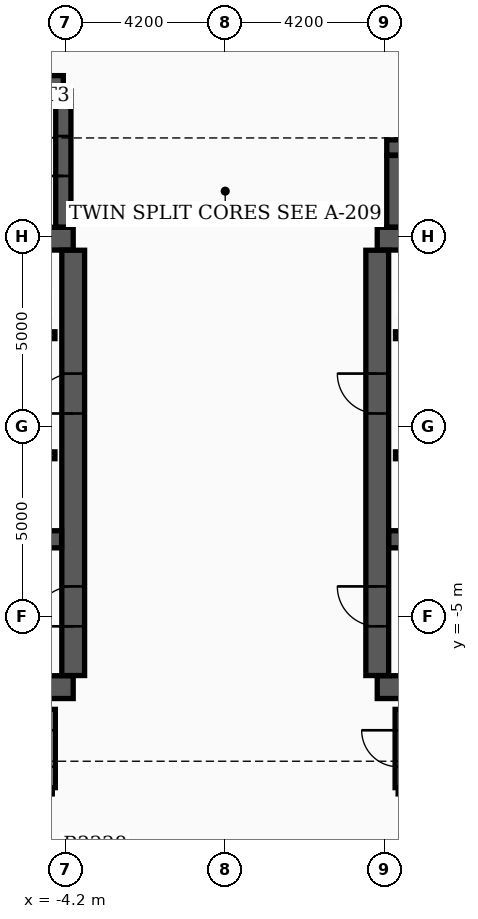
"""IFC4 building model, lengths in metres.
Left out: names, types, materials, properties, quantities, classifications, styles, units other than length and angle.
Written with IfcOpenShell. Run it as: python <this file> out.ifc"""

import sys

from ifc_helpers import new_model, si_unit, direction, frame, frame_2d, origin, place, context, subcontext, project, spatial, rectangle, extrude, element, fill, save


model = new_model("IFC4")
c1 = context("Model", 3, precision=1e-05, world=origin(), true_north=direction((0.0, 1.0)))
c2 = subcontext(c1, "Body", "Model", "MODEL_VIEW")
j1 = project(units=[si_unit("LENGTHUNIT", "METRE"), si_unit("PLANEANGLEUNIT", "RADIAN")], contexts=[c1])
p1 = place(None, origin())
s1 = spatial("IfcSite", under=j1, at=p1, CompositionType="ELEMENT")
p2 = place(p1, origin())
s2 = spatial("IfcBuilding", under=s1, at=p2, CompositionType="ELEMENT")
p3 = place(p2, frame((0.0, 0.0, 139.8)))
s3 = spatial("IfcBuildingStorey", under=s2, at=p3, CompositionType="ELEMENT", Elevation=139.8)
for number, where, z_axis, x_axis in (
    (1, (-12.4, -6.85, 0.0), (0.0, 0.0, 1.0), (1.0, 0.0, 0.0)),
    (2, (-12.4, 4.95, 0.0), (0.0, 0.0, 1.0), (1.0, 0.0, 0.0)),
):
    element("IfcWall", number, at=place(p3, frame(where, z_axis=z_axis, x_axis=x_axis)), inside=s3, PredefinedType="SHEAR", context=c2, shape_type="SweptSolid", body=[
        extrude(rectangle(XDim=8.4, YDim=0.6, at=frame_2d((4.2, 0.0))), origin(), (0.0, 0.0, 1.0), 3.65),
    ])
p4 = place(p3, frame((-4.0, -6.545, 0.0), z_axis=(0.0, 0.0, 1.0), x_axis=(0.0, 1.0, 0.0)))
e3 = element("IfcWall", 3, at=p4, inside=s3, PredefinedType="SHEAR", context=c2, shape_type="SweptSolid", body=[
    extrude(rectangle(XDim=11.19, YDim=0.6, at=frame_2d((5.595, 0.0))), origin(), (0.0, 0.0, 1.0), 3.65),
])
p5 = place(p4, frame((1.295, 0.0, 0.0)))
e4 = element("IfcOpeningElement", 4, at=p5, cuts=e3, PredefinedType="OPENING", context=c2, shape_type="SweptSolid", body=[
    extrude(rectangle(XDim=1.05, YDim=2.15, at=frame_2d((0.525, 1.075))), frame((0.0, 0.31, 0.0), z_axis=(0.0, -1.0, 0.0), x_axis=(1.0, 0.0, 0.0)), (0.0, 0.0, 1.0), 0.62),
])
p6 = place(p4, frame((6.895, 0.0, 0.0)))
e5 = element("IfcOpeningElement", 5, at=p6, cuts=e3, PredefinedType="OPENING", context=c2, shape_type="SweptSolid", body=[
    extrude(rectangle(XDim=1.05, YDim=2.15, at=frame_2d((0.525, 1.075))), frame((0.0, 0.31, 0.0), z_axis=(0.0, -1.0, 0.0), x_axis=(1.0, 0.0, 0.0)), (0.0, 0.0, 1.0), 0.62),
])
p7 = place(p3, frame((-12.095, -2.96, 0.0), z_axis=(0.0, 0.0, 1.0), x_axis=(1.0, 0.0, 0.0)))
e6 = element("IfcWall", 6, at=p7, inside=s3, PredefinedType="SHEAR", context=c2, shape_type="SweptSolid", body=[
    extrude(rectangle(XDim=7.79, YDim=0.45, at=frame_2d((3.895, 0.0))), origin(), (0.0, 0.0, 1.0), 3.65),
])
for number, where, z_axis, x_axis in (
    (7, (4.0, -6.85, 0.0), (0.0, 0.0, 1.0), (1.0, 0.0, 0.0)),
    (8, (4.0, 4.95, 0.0), (0.0, 0.0, 1.0), (1.0, 0.0, 0.0)),
):
    element("IfcWall", number, at=place(p3, frame(where, z_axis=z_axis, x_axis=x_axis)), inside=s3, PredefinedType="SHEAR", context=c2, shape_type="SweptSolid", body=[
        extrude(rectangle(XDim=8.4, YDim=0.6, at=frame_2d((4.2, 0.0))), origin(), (0.0, 0.0, 1.0), 3.65),
    ])
p8 = place(p3, frame((4.0, -6.545, 0.0), z_axis=(0.0, 0.0, 1.0), x_axis=(0.0, 1.0, 0.0)))
e9 = element("IfcWall", 9, at=p8, inside=s3, PredefinedType="SHEAR", context=c2, shape_type="SweptSolid", body=[
    extrude(rectangle(XDim=11.19, YDim=0.6, at=frame_2d((5.595, 0.0))), origin(), (0.0, 0.0, 1.0), 3.65),
])
p9 = place(p8, frame((1.295, 0.0, 0.0)))
e10 = element("IfcOpeningElement", 10, at=p9, cuts=e9, PredefinedType="OPENING", context=c2, shape_type="SweptSolid", body=[
    extrude(rectangle(XDim=1.05, YDim=2.15, at=frame_2d((0.525, 1.075))), frame((0.0, 0.31, 0.0), z_axis=(0.0, -1.0, 0.0), x_axis=(1.0, 0.0, 0.0)), (0.0, 0.0, 1.0), 0.62),
])
p10 = place(p8, frame((6.895, 0.0, 0.0)))
e11 = element("IfcOpeningElement", 11, at=p10, cuts=e9, PredefinedType="OPENING", context=c2, shape_type="SweptSolid", body=[
    extrude(rectangle(XDim=1.05, YDim=2.15, at=frame_2d((0.525, 1.075))), frame((0.0, 0.31, 0.0), z_axis=(0.0, -1.0, 0.0), x_axis=(1.0, 0.0, 0.0)), (0.0, 0.0, 1.0), 0.62),
])
p11 = place(p3, frame((4.305, -2.96, 0.0), z_axis=(0.0, 0.0, 1.0), x_axis=(1.0, 0.0, 0.0)))
e12 = element("IfcWall", 12, at=p11, inside=s3, PredefinedType="SHEAR", context=c2, shape_type="SweptSolid", body=[
    extrude(rectangle(XDim=7.79, YDim=0.45, at=frame_2d((3.895, 0.0))), origin(), (0.0, 0.0, 1.0), 3.65),
])
p12 = place(p3, frame((-12.22, 9.04, 0.0), z_axis=(0.0, 0.0, 1.0), x_axis=(1.0, 0.0, 0.0)))
e13 = element("IfcWall", 13, at=p12, inside=s3, PredefinedType="SHEAR", context=c2, shape_type="SweptSolid", body=[
    extrude(rectangle(XDim=7.96, YDim=0.4, at=frame_2d((3.98, 0.0))), origin(), (0.0, 0.0, 1.0), 3.65),
])
p13 = place(p3, frame((-4.26, 5.255, 0.0), z_axis=(0.0, 0.0, 1.0), x_axis=(0.0, 1.0, 0.0)))
e14 = element("IfcWall", 14, at=p13, inside=s3, PredefinedType="SHEAR", context=c2, shape_type="SweptSolid", body=[
    extrude(rectangle(XDim=3.58, YDim=0.4, at=frame_2d((1.79, 0.0))), origin(), (0.0, 0.0, 1.0), 3.65),
])
p14 = place(p13, frame((1.345, 0.0, 0.0)))
e15 = element("IfcOpeningElement", 15, at=p14, cuts=e14, PredefinedType="OPENING", context=c2, shape_type="SweptSolid", body=[
    extrude(rectangle(XDim=1.05, YDim=2.15, at=frame_2d((0.525, 1.075))), frame((0.0, 0.21, 0.0), z_axis=(0.0, -1.0, 0.0), x_axis=(1.0, 0.0, 0.0)), (0.0, 0.0, 1.0), 0.42),
])
p15 = place(p3, frame((4.45, 5.255, 0.0), z_axis=(0.0, 0.0, 1.0), x_axis=(0.0, 1.0, 0.0)))
e16 = element("IfcWall", 16, at=p15, inside=s3, PredefinedType="SHEAR", context=c2, shape_type="SweptSolid", body=[
    extrude(rectangle(XDim=1.885, YDim=0.4, at=frame_2d((0.942, 0.0))), origin(), (0.0, 0.0, 1.0), 3.65),
])
p16 = place(p3, frame((4.25, 7.35, 0.0), z_axis=(0.0, 0.0, 1.0), x_axis=(1.0, 0.0, 0.0)))
e17 = element("IfcWall", 17, at=p16, inside=s3, PredefinedType="SHEAR", context=c2, shape_type="SweptSolid", body=[
    extrude(rectangle(XDim=5.4, YDim=0.4, at=frame_2d((2.7, 0.0))), origin(), (0.0, 0.0, 1.0), 3.65),
])
p17 = place(p3, frame((-11.9, 2.41, 0.0), z_axis=(0.0, 0.0, 1.0), x_axis=(1.0, 0.0, 0.0)))
e18 = element("IfcWall", 18, at=p17, inside=s3, PredefinedType="SOLIDWALL", context=c2, shape_type="SweptSolid", body=[
    extrude(rectangle(XDim=7.42, YDim=0.18, at=frame_2d((3.71, 0.0))), origin(), (0.0, 0.0, 1.0), 2.91),
])
p18 = place(p17, frame((0.55, 0.0, 0.0)))
e19 = element("IfcOpeningElement", 19, at=p18, cuts=e18, PredefinedType="OPENING", context=c2, shape_type="SweptSolid", body=[
    extrude(rectangle(XDim=1.1, YDim=2.15, at=frame_2d((0.55, 1.075))), frame((0.0, 0.1, 0.0), z_axis=(0.0, -1.0, 0.0), x_axis=(1.0, 0.0, 0.0)), (0.0, 0.0, 1.0), 0.2),
])
p19 = place(p17, frame((4.9, 0.0, 0.0)))
e20 = element("IfcOpeningElement", 20, at=p19, cuts=e18, PredefinedType="OPENING", context=c2, shape_type="SweptSolid", body=[
    extrude(rectangle(XDim=0.88, YDim=2.1, at=frame_2d((0.44, 1.05))), frame((0.0, 0.1, 0.0), z_axis=(0.0, -1.0, 0.0), x_axis=(1.0, 0.0, 0.0)), (0.0, 0.0, 1.0), 0.2),
])
p20 = place(p3, frame((4.48, 2.41, 0.0), z_axis=(0.0, 0.0, 1.0), x_axis=(1.0, 0.0, 0.0)))
e21 = element("IfcWall", 21, at=p20, inside=s3, PredefinedType="SOLIDWALL", context=c2, shape_type="SweptSolid", body=[
    extrude(rectangle(XDim=7.42, YDim=0.18, at=frame_2d((3.71, 0.0))), origin(), (0.0, 0.0, 1.0), 2.91),
])
p21 = place(p20, frame((5.67, 0.0, 0.0)))
e22 = element("IfcOpeningElement", 22, at=p21, cuts=e21, PredefinedType="OPENING", context=c2, shape_type="SweptSolid", body=[
    extrude(rectangle(XDim=1.1, YDim=2.15, at=frame_2d((0.55, 1.075))), frame((0.0, 0.1, 0.0), z_axis=(0.0, -1.0, 0.0), x_axis=(1.0, 0.0, 0.0)), (0.0, 0.0, 1.0), 0.2),
])
p22 = place(p20, frame((1.6, 0.0, 0.0)))
e23 = element("IfcOpeningElement", 23, at=p22, cuts=e21, PredefinedType="OPENING", context=c2, shape_type="SweptSolid", body=[
    extrude(rectangle(XDim=0.88, YDim=2.1, at=frame_2d((0.44, 1.05))), frame((0.0, 0.1, 0.0), z_axis=(0.0, -1.0, 0.0), x_axis=(1.0, 0.0, 0.0)), (0.0, 0.0, 1.0), 0.2),
])
p23 = place(p3, frame((-11.9, -0.75, 0.0), z_axis=(0.0, 0.0, 1.0), x_axis=(1.0, 0.0, 0.0)))
e24 = element("IfcWall", 24, at=p23, inside=s3, PredefinedType="SOLIDWALL", context=c2, shape_type="SweptSolid", body=[
    extrude(rectangle(XDim=7.42, YDim=0.18, at=frame_2d((3.71, 0.0))), origin(), (0.0, 0.0, 1.0), 2.91),
])
p24 = place(p23, frame((0.45, 0.0, 0.0)))
e25 = element("IfcOpeningElement", 25, at=p24, cuts=e24, PredefinedType="OPENING", context=c2, shape_type="SweptSolid", body=[
    extrude(rectangle(XDim=1.1, YDim=2.15, at=frame_2d((0.55, 1.075))), frame((0.0, 0.1, 0.0), z_axis=(0.0, -1.0, 0.0), x_axis=(1.0, 0.0, 0.0)), (0.0, 0.0, 1.0), 0.2),
])
p25 = place(p23, frame((2.35, 0.0, 0.0)))
e26 = element("IfcOpeningElement", 26, at=p25, cuts=e24, PredefinedType="OPENING", context=c2, shape_type="SweptSolid", body=[
    extrude(rectangle(XDim=1.1, YDim=2.15, at=frame_2d((0.55, 1.075))), frame((0.0, 0.1, 0.0), z_axis=(0.0, -1.0, 0.0), x_axis=(1.0, 0.0, 0.0)), (0.0, 0.0, 1.0), 0.2),
])
p26 = place(p3, frame((4.48, -0.75, 0.0), z_axis=(0.0, 0.0, 1.0), x_axis=(1.0, 0.0, 0.0)))
e27 = element("IfcWall", 27, at=p26, inside=s3, PredefinedType="SOLIDWALL", context=c2, shape_type="SweptSolid", body=[
    extrude(rectangle(XDim=7.42, YDim=0.18, at=frame_2d((3.71, 0.0))), origin(), (0.0, 0.0, 1.0), 2.91),
])
p27 = place(p26, frame((0.52, 0.0, 0.0)))
e28 = element("IfcOpeningElement", 28, at=p27, cuts=e27, PredefinedType="OPENING", context=c2, shape_type="SweptSolid", body=[
    extrude(rectangle(XDim=1.1, YDim=2.15, at=frame_2d((0.55, 1.075))), frame((0.0, 0.1, 0.0), z_axis=(0.0, -1.0, 0.0), x_axis=(1.0, 0.0, 0.0)), (0.0, 0.0, 1.0), 0.2),
])
p28 = place(p3, frame((4.55, -9.58, 0.0), z_axis=(0.0, 0.0, 1.0), x_axis=(1.0, 0.0, 0.0)))
e29 = element("IfcWall", 29, at=p28, inside=s3, PredefinedType="PARTITIONING", context=c2, shape_type="SweptSolid", body=[
    extrude(rectangle(XDim=8.1, YDim=0.16, at=frame_2d((4.05, 0.0))), origin(), (0.0, 0.0, 1.0), 2.91),
])
p29 = place(p3, frame((4.55, -9.495, 0.0), z_axis=(0.0, 0.0, 1.0), x_axis=(0.0, 1.0, 0.0)))
e30 = element("IfcWall", 30, at=p29, inside=s3, PredefinedType="PARTITIONING", context=c2, shape_type="SweptSolid", body=[
    extrude(rectangle(XDim=2.06, YDim=0.16, at=frame_2d((1.03, 0.0))), origin(), (0.0, 0.0, 1.0), 2.91),
])
p30 = place(p29, frame((0.55, 0.0, 0.0)))
e31 = element("IfcOpeningElement", 31, at=p30, cuts=e30, PredefinedType="OPENING", context=c2, shape_type="SweptSolid", body=[
    extrude(rectangle(XDim=0.96, YDim=2.15, at=frame_2d((0.48, 1.075))), frame((0.0, 0.09, 0.0), z_axis=(0.0, -1.0, 0.0), x_axis=(1.0, 0.0, 0.0)), (0.0, 0.0, 1.0), 0.18),
])
p31 = place(p3, frame((-4.55, -9.495, 0.0), z_axis=(0.0, 0.0, 1.0), x_axis=(0.0, 1.0, 0.0)))
e32 = element("IfcWall", 32, at=p31, inside=s3, PredefinedType="PARTITIONING", context=c2, shape_type="SweptSolid", body=[
    extrude(rectangle(XDim=2.06, YDim=0.16, at=frame_2d((1.03, 0.0))), origin(), (0.0, 0.0, 1.0), 2.91),
])
p32 = place(p31, frame((0.55, 0.0, 0.0)))
e33 = element("IfcOpeningElement", 33, at=p32, cuts=e32, PredefinedType="OPENING", context=c2, shape_type="SweptSolid", body=[
    extrude(rectangle(XDim=0.96, YDim=2.15, at=frame_2d((0.48, 1.075))), frame((0.0, 0.09, 0.0), z_axis=(0.0, -1.0, 0.0), x_axis=(1.0, 0.0, 0.0)), (0.0, 0.0, 1.0), 0.18),
])
p33 = place(p5, origin())
e34 = element("IfcDoor", 34, at=p33, inside=s3, OperationType="SINGLE_SWING_LEFT", PredefinedType="DOOR", context=c2, shape_type="SweptSolid", body=[
    extrude(rectangle(XDim=1.05, YDim=2.15, at=frame_2d((0.525, 1.075))), frame((0.0, 0.025, 0.0), z_axis=(0.0, -1.0, 0.0), x_axis=(1.0, 0.0, 0.0)), (0.0, 0.0, 1.0), 0.05),
])
fill(e4, e34)
p34 = place(p9, origin())
e35 = element("IfcDoor", 35, at=p34, inside=s3, OperationType="SINGLE_SWING_RIGHT", PredefinedType="DOOR", context=c2, shape_type="SweptSolid", body=[
    extrude(rectangle(XDim=1.05, YDim=2.15, at=frame_2d((0.525, 1.075))), frame((0.0, 0.025, 0.0), z_axis=(0.0, -1.0, 0.0), x_axis=(1.0, 0.0, 0.0)), (0.0, 0.0, 1.0), 0.05),
])
fill(e10, e35)
p35 = place(p6, origin())
e36 = element("IfcDoor", 36, at=p35, inside=s3, OperationType="SINGLE_SWING_LEFT", PredefinedType="DOOR", context=c2, shape_type="SweptSolid", body=[
    extrude(rectangle(XDim=1.05, YDim=2.15, at=frame_2d((0.525, 1.075))), frame((0.0, 0.025, 0.0), z_axis=(0.0, -1.0, 0.0), x_axis=(1.0, 0.0, 0.0)), (0.0, 0.0, 1.0), 0.05),
])
fill(e5, e36)
p36 = place(p10, origin())
e37 = element("IfcDoor", 37, at=p36, inside=s3, OperationType="SINGLE_SWING_RIGHT", PredefinedType="DOOR", context=c2, shape_type="SweptSolid", body=[
    extrude(rectangle(XDim=1.05, YDim=2.15, at=frame_2d((0.525, 1.075))), frame((0.0, 0.025, 0.0), z_axis=(0.0, -1.0, 0.0), x_axis=(1.0, 0.0, 0.0)), (0.0, 0.0, 1.0), 0.05),
])
fill(e11, e37)
p37 = place(p14, origin())
e38 = element("IfcDoor", 38, at=p37, inside=s3, OperationType="SINGLE_SWING_LEFT", PredefinedType="DOOR", context=c2, shape_type="SweptSolid", body=[
    extrude(rectangle(XDim=1.05, YDim=2.15, at=frame_2d((0.525, 1.075))), frame((0.0, 0.025, 0.0), z_axis=(0.0, -1.0, 0.0), x_axis=(1.0, 0.0, 0.0)), (0.0, 0.0, 1.0), 0.05),
])
fill(e15, e38)
p38 = place(p30, origin())
e39 = element("IfcDoor", 39, at=p38, inside=s3, OperationType="SINGLE_SWING_RIGHT", PredefinedType="DOOR", context=c2, shape_type="SweptSolid", body=[
    extrude(rectangle(XDim=0.96, YDim=2.15, at=frame_2d((0.48, 1.075))), frame((0.0, 0.025, 0.0), z_axis=(0.0, -1.0, 0.0), x_axis=(1.0, 0.0, 0.0)), (0.0, 0.0, 1.0), 0.05),
])
fill(e31, e39)
p39 = place(p32, origin())
e40 = element("IfcDoor", 40, at=p39, inside=s3, OperationType="SINGLE_SWING_LEFT", PredefinedType="DOOR", context=c2, shape_type="SweptSolid", body=[
    extrude(rectangle(XDim=0.96, YDim=2.15, at=frame_2d((0.48, 1.075))), frame((0.0, 0.025, 0.0), z_axis=(0.0, -1.0, 0.0), x_axis=(1.0, 0.0, 0.0)), (0.0, 0.0, 1.0), 0.05),
])
fill(e33, e40)
save(model, sys.argv[1])
